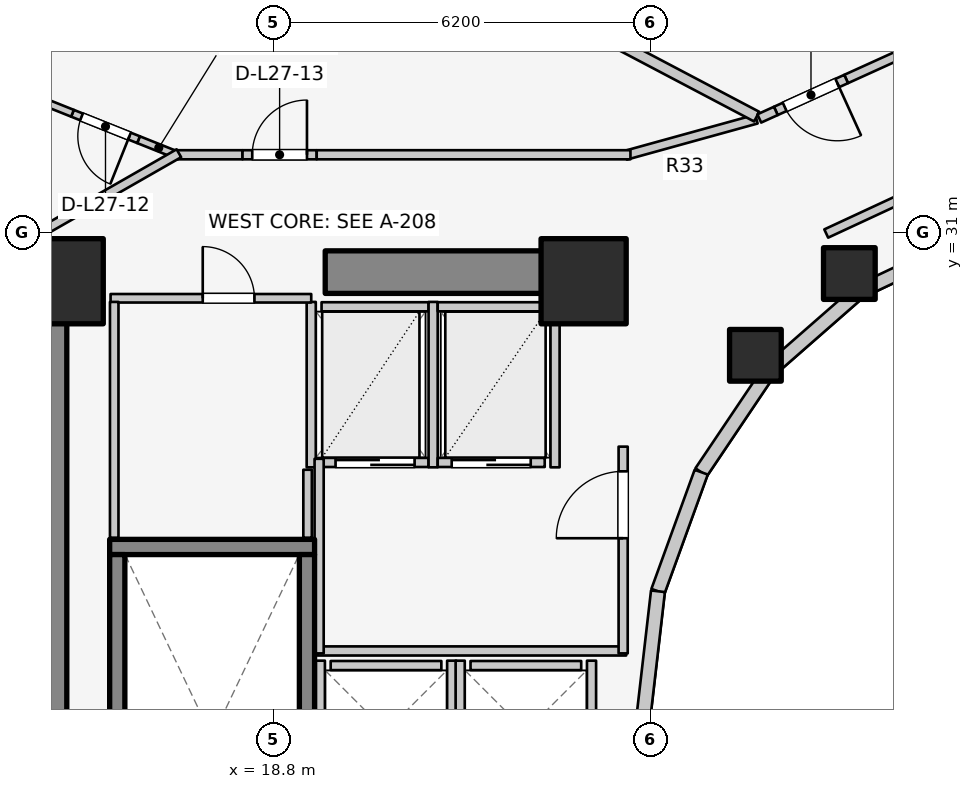
"""IFC4 building model, lengths in metres.
Left out: names, types, materials, properties, quantities, classifications, styles, units other than length and angle.
Written with IfcOpenShell. Run it as: python <this file> out.ifc"""

import sys

from ifc_helpers import new_model, si_unit, direction, frame, frame_2d, origin, origin_2d, place, context, subcontext, project, spatial, rectangle, extrude, element, fill, save


model = new_model("IFC4")
c1 = context("Model", 3, precision=1e-05, world=origin(), true_north=direction((0.0, 1.0)))
c2 = subcontext(c1, "Body", "Model", "MODEL_VIEW")
j1 = project(units=[si_unit("LENGTHUNIT", "METRE"), si_unit("PLANEANGLEUNIT", "RADIAN")], contexts=[c1])
p1 = place(None, origin())
s1 = spatial("IfcSite", under=j1, at=p1, CompositionType="ELEMENT")
p2 = place(p1, origin())
s2 = spatial("IfcBuilding", under=s1, at=p2, CompositionType="ELEMENT")
p3 = place(p2, frame((0.0, 0.0, 91.8)))
s3 = spatial("IfcBuildingStorey", under=s2, at=p3, CompositionType="ELEMENT", Elevation=91.8)
p4 = place(p3, frame((15.05, 17.05, 0.0), z_axis=(0.0, 0.0, 1.0), x_axis=(0.0, 1.0, 0.0)))
e1 = element("IfcWall", 1, at=p4, inside=s3, PredefinedType="SHEAR", context=c2, shape_type="SweptSolid", body=[
    extrude(rectangle(XDim=12.8, YDim=0.7, at=frame_2d((6.4, 0.0))), origin(), (0.0, 0.0, 1.0), 3.1),
])
p5 = place(p3, frame((19.65, 30.35, 0.0), z_axis=(0.0, 0.0, 1.0), x_axis=(1.0, 0.0, 0.0)))
e2 = element("IfcWall", 2, at=p5, inside=s3, PredefinedType="SHEAR", context=c2, shape_type="SweptSolid", body=[
    extrude(rectangle(XDim=4.5, YDim=0.7, at=frame_2d((2.25, 0.0))), origin(), (0.0, 0.0, 1.0), 3.1),
])
p6 = place(p3, frame((16.105, 25.83, 0.0), z_axis=(0.0, 0.0, 1.0), x_axis=(1.0, 0.0, 0.0)))
e3 = element("IfcWall", 3, at=p6, inside=s3, PredefinedType="SOLIDWALL", context=c2, shape_type="SweptSolid", body=[
    extrude(rectangle(XDim=3.37, YDim=0.25, at=frame_2d((1.685, 0.0))), origin(), (0.0, 0.0, 1.0), 3.1),
])
for number, where, z_axis, x_axis in (
    (4, (16.23, 17.895, 0.0), (0.0, 0.0, 1.0), (0.0, 1.0, 0.0)),
    (5, (19.35, 17.895, 0.0), (0.0, 0.0, 1.0), (0.0, 1.0, 0.0)),
):
    element("IfcWall", number, at=place(p3, frame(where, z_axis=z_axis, x_axis=x_axis)), inside=s3, PredefinedType="SOLIDWALL", context=c2, shape_type="SweptSolid", body=[
        extrude(rectangle(XDim=7.81, YDim=0.25, at=frame_2d((3.905, 0.0))), origin(), (0.0, 0.0, 1.0), 3.1),
    ])
for number, where, z_axis, x_axis in (
    (6, (23.9, 30.2, 0.0), (0.0, 0.0, 1.0), (1.0, 0.0, 0.0)),
    (7, (15.3, 30.2, 0.0), (0.0, 0.0, 1.0), (1.0, 0.0, 0.0)),
):
    element("IfcColumn", number, at=place(p3, frame(where, z_axis=z_axis, x_axis=x_axis)), inside=s3, PredefinedType="COLUMN", context=c2, shape_type="SweptSolid", body=[
        extrude(rectangle(XDim=1.4, YDim=1.4, at=origin_2d()), origin(), (0.0, 0.0, 1.0), 3.1),
    ])
for number, where, z_axis, x_axis in (
    (8, (28.27, 30.327, 0.0), (0.0, 0.0, 1.0), (1.0, 0.0, 0.0)),
    (9, (26.725, 28.982, 0.0), (0.0, 0.0, 1.0), (1.0, 0.0, 0.0)),
):
    element("IfcColumn", number, at=place(p3, frame(where, z_axis=z_axis, x_axis=x_axis)), inside=s3, PredefinedType="COLUMN", context=c2, shape_type="SweptSolid", body=[
        extrude(rectangle(XDim=0.85, YDim=0.85, at=origin_2d()), origin(), (0.0, 0.0, 1.0), 3.1),
    ])
p7 = place(p3, frame((30.157, 30.843, 0.0), z_axis=(0.0, 0.0, 1.0), x_axis=(-0.904179699603, -0.427152280606, 0.0)))
e10 = element("IfcWall", 10, at=p7, inside=s3, PredefinedType="STANDARD", context=c2, shape_type="SweptSolid", body=[
    extrude(rectangle(XDim=1.899, YDim=0.23, at=frame_2d((0.95, 0.0))), origin(), (0.0, 0.0, 1.0), 1.22),
])
p8 = place(p3, frame((28.44, 30.032, 0.0), z_axis=(0.0, 0.0, 1.0), x_axis=(-0.752576694707, -0.658504607869, 0.0)))
e11 = element("IfcWall", 11, at=p8, inside=s3, PredefinedType="STANDARD", context=c2, shape_type="SweptSolid", body=[
    extrude(rectangle(XDim=1.959, YDim=0.23, at=frame_2d((0.98, 0.0))), origin(), (0.0, 0.0, 1.0), 1.22),
])
p9 = place(p3, frame((26.965, 28.742, 0.0), z_axis=(0.0, 0.0, 1.0), x_axis=(-0.558197800898, -0.829707909492, 0.0)))
e12 = element("IfcWall", 12, at=p9, inside=s3, PredefinedType="STANDARD", context=c2, shape_type="SweptSolid", body=[
    extrude(rectangle(XDim=2.027, YDim=0.23, at=frame_2d((1.013, 0.0))), origin(), (0.0, 0.0, 1.0), 1.22),
])
p10 = place(p3, frame((25.834, 27.06, 0.0), z_axis=(0.0, 0.0, 1.0), x_axis=(-0.341423187295, -0.93990968033, 0.0)))
e13 = element("IfcWall", 13, at=p10, inside=s3, PredefinedType="STANDARD", context=c2, shape_type="SweptSolid", body=[
    extrude(rectangle(XDim=2.084, YDim=0.23, at=frame_2d((1.042, 0.0))), origin(), (0.0, 0.0, 1.0), 2.56),
])
p11 = place(p3, frame((25.123, 25.102, 0.0), z_axis=(0.0, 0.0, 1.0), x_axis=(-0.114711713601, -0.993398823617, 0.0)))
e14 = element("IfcWall", 14, at=p11, inside=s3, PredefinedType="STANDARD", context=c2, shape_type="SweptSolid", body=[
    extrude(rectangle(XDim=2.115, YDim=0.23, at=frame_2d((1.058, 0.0))), origin(), (0.0, 0.0, 1.0), 2.56),
])
p12 = place(p3, frame((19.74, 23.88, 0.0), z_axis=(0.0, 0.0, 1.0), x_axis=(1.0, 0.0, 0.0)))
e15 = element("IfcWall", 15, at=p12, inside=s3, PredefinedType="SOLIDWALL", context=c2, shape_type="SweptSolid", body=[
    extrude(rectangle(XDim=1.82, YDim=0.15, at=frame_2d((0.91, 0.0))), origin(), (0.0, 0.0, 1.0), 2.575),
])
for number, where, z_axis, x_axis in (
    (16, (19.57, 21.64, 0.0), (0.0, 0.0, 1.0), (0.0, 1.0, 0.0)),
    (17, (21.73, 21.64, 0.0), (0.0, 0.0, 1.0), (0.0, 1.0, 0.0)),
):
    element("IfcWall", number, at=place(p3, frame(where, z_axis=z_axis, x_axis=x_axis)), inside=s3, PredefinedType="SOLIDWALL", context=c2, shape_type="SweptSolid", body=[
        extrude(rectangle(XDim=2.32, YDim=0.15, at=frame_2d((1.16, 0.0))), origin(), (0.0, 0.0, 1.0), 2.575),
    ])
p13 = place(p3, frame((22.04, 23.88, 0.0), z_axis=(0.0, 0.0, 1.0), x_axis=(1.0, 0.0, 0.0)))
e18 = element("IfcWall", 18, at=p13, inside=s3, PredefinedType="SOLIDWALL", context=c2, shape_type="SweptSolid", body=[
    extrude(rectangle(XDim=1.82, YDim=0.15, at=frame_2d((0.91, 0.0))), origin(), (0.0, 0.0, 1.0), 2.12),
])
p14 = place(p3, frame((21.87, 21.64, 0.0), z_axis=(0.0, 0.0, 1.0), x_axis=(0.0, 1.0, 0.0)))
e19 = element("IfcWall", 19, at=p14, inside=s3, PredefinedType="SOLIDWALL", context=c2, shape_type="SweptSolid", body=[
    extrude(rectangle(XDim=2.32, YDim=0.15, at=frame_2d((1.16, 0.0))), origin(), (0.0, 0.0, 1.0), 2.575),
])
p15 = place(p3, frame((24.03, 21.64, 0.0), z_axis=(0.0, 0.0, 1.0), x_axis=(0.0, 1.0, 0.0)))
e20 = element("IfcWall", 20, at=p15, inside=s3, PredefinedType="SOLIDWALL", context=c2, shape_type="SweptSolid", body=[
    extrude(rectangle(XDim=2.32, YDim=0.15, at=frame_2d((1.16, 0.0))), origin(), (0.0, 0.0, 1.0), 2.12),
])
p16 = place(p3, frame((19.59, 27.22, 0.0), z_axis=(0.0, 0.0, 1.0), x_axis=(1.0, 0.0, 0.0)))
e21 = element("IfcWall", 21, at=p16, inside=s3, PredefinedType="SOLIDWALL", context=c2, shape_type="SweptSolid", body=[
    extrude(rectangle(XDim=1.76, YDim=0.15, at=frame_2d((0.88, 0.0))), origin(), (0.0, 0.0, 1.0), 2.575),
])
p17 = place(p16, frame((0.23, 0.0, 0.0)))
e22 = element("IfcOpeningElement", 22, at=p17, cuts=e21, PredefinedType="OPENING", context=c2, shape_type="SweptSolid", body=[
    extrude(rectangle(XDim=1.3, YDim=2.1, at=frame_2d((0.65, 1.05))), frame((0.0, 0.085, 0.0), z_axis=(0.0, -1.0, 0.0), x_axis=(1.0, 0.0, 0.0)), (0.0, 0.0, 1.0), 0.17),
])
p18 = place(p3, frame((19.59, 29.78, 0.0), z_axis=(0.0, 0.0, 1.0), x_axis=(1.0, 0.0, 0.0)))
e23 = element("IfcWall", 23, at=p18, inside=s3, PredefinedType="SOLIDWALL", context=c2, shape_type="SweptSolid", body=[
    extrude(rectangle(XDim=1.76, YDim=0.15, at=frame_2d((0.88, 0.0))), origin(), (0.0, 0.0, 1.0), 2.575),
])
for number, where, z_axis, x_axis in (
    (24, (19.42, 27.14, 0.0), (0.0, 0.0, 1.0), (0.0, 1.0, 0.0)),
    (25, (21.425, 27.14, 0.0), (0.0, 0.0, 1.0), (0.0, 1.0, 0.0)),
):
    element("IfcWall", number, at=place(p3, frame(where, z_axis=z_axis, x_axis=x_axis)), inside=s3, PredefinedType="SOLIDWALL", context=c2, shape_type="SweptSolid", body=[
        extrude(rectangle(XDim=2.72, YDim=0.15, at=frame_2d((1.36, 0.0))), origin(), (0.0, 0.0, 1.0), 2.575),
    ])
p19 = place(p3, frame((21.5, 27.22, 0.0), z_axis=(0.0, 0.0, 1.0), x_axis=(1.0, 0.0, 0.0)))
e26 = element("IfcWall", 26, at=p19, inside=s3, PredefinedType="SOLIDWALL", context=c2, shape_type="SweptSolid", body=[
    extrude(rectangle(XDim=1.76, YDim=0.15, at=frame_2d((0.88, 0.0))), origin(), (0.0, 0.0, 1.0), 2.575),
])
p20 = place(p19, frame((0.23, 0.0, 0.0)))
e27 = element("IfcOpeningElement", 27, at=p20, cuts=e26, PredefinedType="OPENING", context=c2, shape_type="SweptSolid", body=[
    extrude(rectangle(XDim=1.3, YDim=2.1, at=frame_2d((0.65, 1.05))), frame((0.0, 0.085, 0.0), z_axis=(0.0, -1.0, 0.0), x_axis=(1.0, 0.0, 0.0)), (0.0, 0.0, 1.0), 0.17),
])
p21 = place(p3, frame((21.5, 29.78, 0.0), z_axis=(0.0, 0.0, 1.0), x_axis=(1.0, 0.0, 0.0)))
e28 = element("IfcWall", 28, at=p21, inside=s3, PredefinedType="SOLIDWALL", context=c2, shape_type="SweptSolid", body=[
    extrude(rectangle(XDim=1.76, YDim=0.15, at=frame_2d((0.88, 0.0))), origin(), (0.0, 0.0, 1.0), 2.575),
])
p22 = place(p3, frame((23.43, 27.14, 0.0), z_axis=(0.0, 0.0, 1.0), x_axis=(0.0, 1.0, 0.0)))
e29 = element("IfcWall", 29, at=p22, inside=s3, PredefinedType="SOLIDWALL", context=c2, shape_type="SweptSolid", body=[
    extrude(rectangle(XDim=2.72, YDim=0.15, at=frame_2d((1.36, 0.0))), origin(), (0.0, 0.0, 1.0), 2.575),
])
p23 = place(p3, frame((19.52, 24.12, 0.0), z_axis=(0.0, 0.0, 1.0), x_axis=(1.0, 0.0, 0.0)))
e30 = element("IfcWall", 30, at=p23, inside=s3, PredefinedType="PARTITIONING", context=c2, shape_type="SweptSolid", body=[
    extrude(rectangle(XDim=5.08, YDim=0.15, at=frame_2d((2.54, 0.0))), origin(), (0.0, 0.0, 1.0), 2.12),
])
p24 = place(p3, frame((19.55, 24.08, 0.0), z_axis=(0.0, 0.0, 1.0), x_axis=(0.0, 1.0, 0.0)))
e31 = element("IfcWall", 31, at=p24, inside=s3, PredefinedType="PARTITIONING", context=c2, shape_type="SweptSolid", body=[
    extrude(rectangle(XDim=3.2, YDim=0.15, at=frame_2d((1.6, 0.0))), origin(), (0.0, 0.0, 1.0), 2.575),
])
p25 = place(p3, frame((24.55, 24.08, 0.0), z_axis=(0.0, 0.0, 1.0), x_axis=(0.0, 1.0, 0.0)))
e32 = element("IfcWall", 32, at=p25, inside=s3, PredefinedType="PARTITIONING", context=c2, shape_type="SweptSolid", body=[
    extrude(rectangle(XDim=3.4, YDim=0.15, at=frame_2d((1.7, 0.0))), origin(), (0.0, 0.0, 1.0), 2.575),
])
p26 = place(p25, frame((1.894, 0.0, 0.0)))
e33 = element("IfcOpeningElement", 33, at=p26, cuts=e32, PredefinedType="OPENING", context=c2, shape_type="SweptSolid", body=[
    extrude(rectangle(XDim=1.1, YDim=2.1, at=frame_2d((0.55, 1.05))), frame((0.0, 0.085, 0.0), z_axis=(0.0, -1.0, 0.0), x_axis=(1.0, 0.0, 0.0)), (0.0, 0.0, 1.0), 0.17),
])
p27 = place(p3, frame((16.12, 29.92, 0.0), z_axis=(0.0, 0.0, 1.0), x_axis=(1.0, 0.0, 0.0)))
e34 = element("IfcWall", 34, at=p27, inside=s3, PredefinedType="PLUMBINGWALL", context=c2, shape_type="SweptSolid", body=[
    extrude(rectangle(XDim=3.3, YDim=0.14, at=frame_2d((1.65, 0.0))), origin(), (0.0, 0.0, 1.0), 2.575),
])
p28 = place(p27, frame((1.516, 0.0, 0.0)))
e35 = element("IfcOpeningElement", 35, at=p28, cuts=e34, PredefinedType="OPENING", context=c2, shape_type="SweptSolid", body=[
    extrude(rectangle(XDim=0.85, YDim=2.05, at=frame_2d((0.425, 1.025))), frame((0.0, 0.08, 0.0), z_axis=(0.0, -1.0, 0.0), x_axis=(1.0, 0.0, 0.0)), (0.0, 0.0, 1.0), 0.16),
])
p29 = place(p3, frame((16.18, 25.98, 0.0), z_axis=(0.0, 0.0, 1.0), x_axis=(0.0, 1.0, 0.0)))
e36 = element("IfcWall", 36, at=p29, inside=s3, PredefinedType="PLUMBINGWALL", context=c2, shape_type="SweptSolid", body=[
    extrude(rectangle(XDim=3.88, YDim=0.14, at=frame_2d((1.94, 0.0))), origin(), (0.0, 0.0, 1.0), 2.575),
])
p30 = place(p3, frame((19.36, 25.98, 0.0), z_axis=(0.0, 0.0, 1.0), x_axis=(0.0, 1.0, 0.0)))
e37 = element("IfcWall", 37, at=p30, inside=s3, PredefinedType="PLUMBINGWALL", context=c2, shape_type="SweptSolid", body=[
    extrude(rectangle(XDim=1.12, YDim=0.14, at=frame_2d((0.56, 0.0))), origin(), (0.0, 0.0, 1.0), 2.575),
])
p31 = place(p3, frame((29.873, 31.906, 0.0), z_axis=(0.0, 0.0, 1.0), x_axis=(-0.906943449489, -0.421252393975, 0.0)))
e38 = element("IfcWall", 38, at=p31, inside=s3, PredefinedType="PARTITIONING", context=c2, shape_type="SweptSolid", body=[
    extrude(rectangle(XDim=2.186, YDim=0.15, at=frame_2d((1.093, 0.0))), origin(), (0.0, 0.0, 1.0), 1.992),
])
p32 = place(p3, frame((17.246, 32.261, 0.0), z_axis=(0.0, 0.0, 1.0), x_axis=(-0.928523579206, 0.371273434087, 0.0)))
e39 = element("IfcWall", 39, at=p32, inside=s3, PredefinedType="MOVABLE", context=c2, shape_type="SweptSolid", body=[
    extrude(rectangle(XDim=0.718, YDim=0.12, at=frame_2d((0.359, 0.0))), origin(), (0.0, 0.0, 1.0), 2.575),
])
p33 = place(p3, frame((16.58, 32.528, 0.0), z_axis=(0.0, 0.0, 1.0), x_axis=(-0.928519864551, 0.371282723991, 0.0)))
e40 = element("IfcWall", 40, at=p33, inside=s3, PredefinedType="MOVABLE", context=c2, shape_type="SweptSolid", body=[
    extrude(rectangle(XDim=1.17, YDim=0.12, at=frame_2d((0.585, 0.0))), origin(), (0.0, 0.0, 1.0), 2.11),
])
p34 = place(p33, frame((0.16, 0.0, 0.0)))
e41 = element("IfcOpeningElement", 41, at=p34, cuts=e40, PredefinedType="OPENING", context=c2, shape_type="SweptSolid", body=[
    extrude(rectangle(XDim=0.85, YDim=2.05, at=frame_2d((0.425, 1.025))), frame((0.0, 0.07, 0.0), z_axis=(0.0, -1.0, 0.0), x_axis=(1.0, 0.0, 0.0)), (0.0, 0.0, 1.0), 0.14),
])
p35 = place(p3, frame((15.493, 32.962, 0.0), z_axis=(0.0, 0.0, 1.0), x_axis=(-0.928505377566, 0.37131895162, 0.0)))
e42 = element("IfcWall", 42, at=p35, inside=s3, PredefinedType="MOVABLE", context=c2, shape_type="SweptSolid", body=[
    extrude(rectangle(XDim=2.934, YDim=0.12, at=frame_2d((1.467, 0.0))), origin(), (0.0, 0.0, 1.0), 1.22),
])
p36 = place(p3, frame((26.742, 32.867, 0.0), z_axis=(0.0, 0.0, 1.0), x_axis=(-0.963833843713, -0.266503886865, 0.0)))
e43 = element("IfcWall", 43, at=p36, inside=s3, PredefinedType="PARTITIONING", context=c2, shape_type="SweptSolid", body=[
    extrude(rectangle(XDim=2.232, YDim=0.15, at=frame_2d((1.116, 0.0))), origin(), (0.0, 0.0, 1.0), 1.992),
])
p37 = place(p3, frame((17.15, 32.28, 0.0), z_axis=(0.0, 0.0, 1.0), x_axis=(1.0, 0.0, 0.0)))
e44 = element("IfcWall", 44, at=p37, inside=s3, PredefinedType="PARTITIONING", context=c2, shape_type="SweptSolid", body=[
    extrude(rectangle(XDim=1.14, YDim=0.15, at=frame_2d((0.57, 0.0))), origin(), (0.0, 0.0, 1.0), 2.575),
])
p38 = place(p3, frame((18.29, 32.28, 0.0), z_axis=(0.0, 0.0, 1.0), x_axis=(1.0, 0.0, 0.0)))
e45 = element("IfcWall", 45, at=p38, inside=s3, PredefinedType="PARTITIONING", context=c2, shape_type="SweptSolid", body=[
    extrude(rectangle(XDim=1.22, YDim=0.15, at=frame_2d((0.61, 0.0))), origin(), (0.0, 0.0, 1.0), 2.575),
])
p39 = place(p38, frame((0.16, 0.0, 0.0)))
e46 = element("IfcOpeningElement", 46, at=p39, cuts=e45, PredefinedType="OPENING", context=c2, shape_type="SweptSolid", body=[
    extrude(rectangle(XDim=0.9, YDim=2.1, at=frame_2d((0.45, 1.05))), frame((0.0, 0.085, 0.0), z_axis=(0.0, -1.0, 0.0), x_axis=(1.0, 0.0, 0.0)), (0.0, 0.0, 1.0), 0.17),
])
p40 = place(p3, frame((19.51, 32.28, 0.0), z_axis=(0.0, 0.0, 1.0), x_axis=(1.0, 0.0, 0.0)))
e47 = element("IfcWall", 47, at=p40, inside=s3, PredefinedType="PARTITIONING", context=c2, shape_type="SweptSolid", body=[
    extrude(rectangle(XDim=5.16, YDim=0.15, at=frame_2d((2.58, 0.0))), origin(), (0.0, 0.0, 1.0), 1.992),
])
p41 = place(p3, frame((17.243, 32.305, 0.0), z_axis=(0.0, 0.0, 1.0), x_axis=(-0.867991349648, -0.496579315857, 0.0)))
e48 = element("IfcWall", 48, at=p41, inside=s3, PredefinedType="PARTITIONING", context=c2, shape_type="SweptSolid", body=[
    extrude(rectangle(XDim=2.567, YDim=0.15, at=frame_2d((1.283, 0.0))), origin(), (0.0, 0.0, 1.0), 1.22),
])
p42 = place(p3, frame((26.746, 32.907, 0.0), z_axis=(0.0, 0.0, 1.0), x_axis=(-0.884730147854, 0.466103599512, 0.0)))
e49 = element("IfcWall", 49, at=p42, inside=s3, PredefinedType="PARTITIONING", context=c2, shape_type="SweptSolid", body=[
    extrude(rectangle(XDim=8.31, YDim=0.18, at=frame_2d((4.155, 0.0))), origin(), (0.0, 0.0, 1.0), 1.22),
])
p43 = place(p3, frame((29.344, 33.989, 0.0), z_axis=(0.0, 0.0, 1.0), x_axis=(-0.757267205396, 0.653105182671, 0.0)))
e50 = element("IfcWall", 50, at=p43, inside=s3, PredefinedType="PLUMBINGWALL", context=c2, shape_type="SweptSolid", body=[
    extrude(rectangle(XDim=2.1, YDim=0.14, at=frame_2d((1.05, 0.0))), origin(), (0.0, 0.0, 1.0), 2.105),
])
p44 = place(p3, frame((29.313, 34.023, 0.0), z_axis=(0.0, 0.0, 1.0), x_axis=(-0.910560970219, -0.413374793032, 0.0)))
e51 = element("IfcWall", 51, at=p44, inside=s3, PredefinedType="PARTITIONING", context=c2, shape_type="SweptSolid", body=[
    extrude(rectangle(XDim=1.203, YDim=0.15, at=frame_2d((0.602, 0.0))), origin(), (0.0, 0.0, 1.0), 1.992),
])
p45 = place(p3, frame((28.217, 33.526, 0.0), z_axis=(0.0, 0.0, 1.0), x_axis=(-0.910563905594, -0.413368327075, 0.0)))
e52 = element("IfcWall", 52, at=p45, inside=s3, PredefinedType="PARTITIONING", context=c2, shape_type="SweptSolid", body=[
    extrude(rectangle(XDim=1.27, YDim=0.15, at=frame_2d((0.635, 0.0))), origin(), (0.0, 0.0, 1.0), 2.16),
])
p46 = place(p45, frame((0.16, 0.0, 0.0)))
e53 = element("IfcOpeningElement", 53, at=p46, cuts=e52, PredefinedType="OPENING", context=c2, shape_type="SweptSolid", body=[
    extrude(rectangle(XDim=0.95, YDim=2.1, at=frame_2d((0.475, 1.05))), frame((0.0, 0.085, 0.0), z_axis=(0.0, -1.0, 0.0), x_axis=(1.0, 0.0, 0.0)), (0.0, 0.0, 1.0), 0.17),
])
p47 = place(p3, frame((27.061, 33.001, 0.0), z_axis=(0.0, 0.0, 1.0), x_axis=(-0.910618030944, -0.413249079514, 0.0)))
e54 = element("IfcWall", 54, at=p47, inside=s3, PredefinedType="PARTITIONING", context=c2, shape_type="SweptSolid", body=[
    extrude(rectangle(XDim=0.299, YDim=0.15, at=frame_2d((0.149, 0.0))), origin(), (0.0, 0.0, 1.0), 2.575),
])
p48 = place(p17, origin())
e55 = element("IfcDoor", 55, at=p48, inside=s3, OperationType="DOUBLE_DOOR_SLIDING", PredefinedType="DOOR", context=c2, shape_type="SweptSolid", body=[
    extrude(rectangle(XDim=1.3, YDim=2.1, at=frame_2d((0.65, 1.05))), frame((0.0, 0.025, 0.0), z_axis=(0.0, -1.0, 0.0), x_axis=(1.0, 0.0, 0.0)), (0.0, 0.0, 1.0), 0.05),
])
fill(e22, e55)
p49 = place(p20, origin())
e56 = element("IfcDoor", 56, at=p49, inside=s3, OperationType="DOUBLE_DOOR_SLIDING", PredefinedType="DOOR", context=c2, shape_type="SweptSolid", body=[
    extrude(rectangle(XDim=1.3, YDim=2.1, at=frame_2d((0.65, 1.05))), frame((0.0, 0.025, 0.0), z_axis=(0.0, -1.0, 0.0), x_axis=(1.0, 0.0, 0.0)), (0.0, 0.0, 1.0), 0.05),
])
fill(e27, e56)
p50 = place(p26, origin())
e57 = element("IfcDoor", 57, at=p50, inside=s3, OperationType="SINGLE_SWING_LEFT", PredefinedType="DOOR", context=c2, shape_type="SweptSolid", body=[
    extrude(rectangle(XDim=1.1, YDim=2.1, at=frame_2d((0.55, 1.05))), frame((0.0, 0.025, 0.0), z_axis=(0.0, -1.0, 0.0), x_axis=(1.0, 0.0, 0.0)), (0.0, 0.0, 1.0), 0.05),
])
fill(e33, e57)
p51 = place(p28, origin())
e58 = element("IfcDoor", 58, at=p51, inside=s3, OperationType="SINGLE_SWING_LEFT", PredefinedType="DOOR", context=c2, shape_type="SweptSolid", body=[
    extrude(rectangle(XDim=0.85, YDim=2.05, at=frame_2d((0.425, 1.025))), frame((0.0, 0.025, 0.0), z_axis=(0.0, -1.0, 0.0), x_axis=(1.0, 0.0, 0.0)), (0.0, 0.0, 1.0), 0.05),
])
fill(e35, e58)
p52 = place(p34, origin())
e59 = element("IfcDoor", 59, at=p52, inside=s3, OperationType="SINGLE_SWING_LEFT", PredefinedType="DOOR", context=c2, shape_type="SweptSolid", body=[
    extrude(rectangle(XDim=0.85, YDim=2.05, at=frame_2d((0.425, 1.025))), frame((0.0, 0.025, 0.0), z_axis=(0.0, -1.0, 0.0), x_axis=(1.0, 0.0, 0.0)), (0.0, 0.0, 1.0), 0.05),
])
fill(e41, e59)
p53 = place(p39, origin())
e60 = element("IfcDoor", 60, at=p53, inside=s3, OperationType="SINGLE_SWING_RIGHT", PredefinedType="DOOR", context=c2, shape_type="SweptSolid", body=[
    extrude(rectangle(XDim=0.9, YDim=2.1, at=frame_2d((0.45, 1.05))), frame((0.0, 0.025, 0.0), z_axis=(0.0, -1.0, 0.0), x_axis=(1.0, 0.0, 0.0)), (0.0, 0.0, 1.0), 0.05),
])
fill(e46, e60)
p54 = place(p46, origin())
e61 = element("IfcDoor", 61, at=p54, inside=s3, OperationType="SINGLE_SWING_LEFT", PredefinedType="DOOR", context=c2, shape_type="SweptSolid", body=[
    extrude(rectangle(XDim=0.95, YDim=2.1, at=frame_2d((0.475, 1.05))), frame((0.0, 0.025, 0.0), z_axis=(0.0, -1.0, 0.0), x_axis=(1.0, 0.0, 0.0)), (0.0, 0.0, 1.0), 0.05),
])
fill(e53, e61)
save(model, sys.argv[1])
